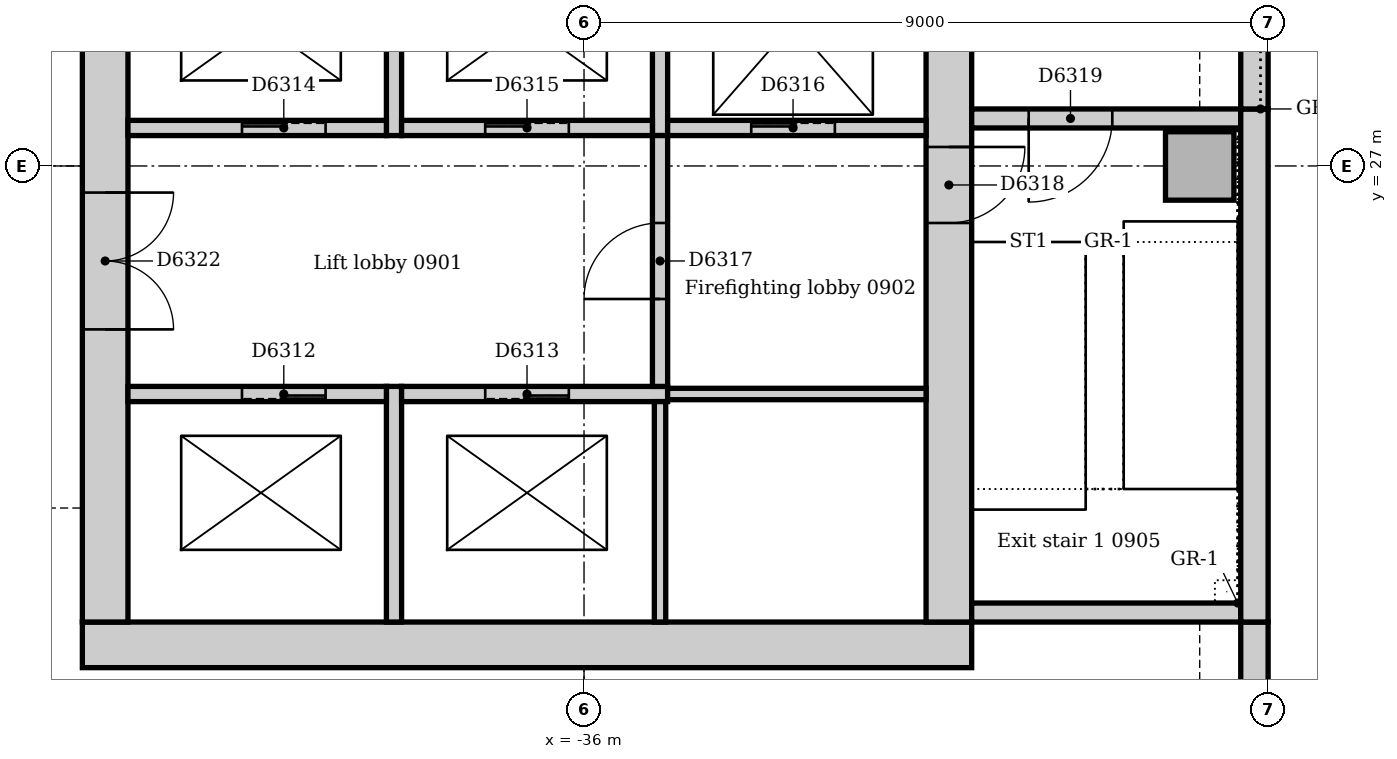
"""IFC4 building model, lengths in metres.
Left out: names, types, materials, properties, quantities, classifications, styles, units other than length and angle.
Written with IfcOpenShell. Run it as: python <this file> out.ifc"""

import sys

from ifc_helpers import new_model, si_unit, direction, frame, frame_2d, origin, origin_2d, place, context, subcontext, project, spatial, rectangle, extrude, element, fill, save


model = new_model("IFC4")
c1 = context("Model", 3, precision=1e-05, world=origin(), true_north=direction((0.0, 1.0)))
c2 = subcontext(c1, "Body", "Model", "MODEL_VIEW")
j1 = project(units=[si_unit("LENGTHUNIT", "METRE"), si_unit("PLANEANGLEUNIT", "RADIAN")], contexts=[c1])
p1 = place(None, origin())
s1 = spatial("IfcSite", under=j1, at=p1, CompositionType="ELEMENT")
p2 = place(p1, origin())
s2 = spatial("IfcBuilding", under=s1, at=p2, CompositionType="ELEMENT")
p3 = place(p2, frame((0.0, 0.0, 42.0)))
s3 = spatial("IfcBuildingStorey", under=s2, at=p3, CompositionType="ELEMENT", Elevation=42.0)
p4 = place(p3, frame((-42.6, 20.7, 0.0), z_axis=(0.0, 0.0, 1.0), x_axis=(1.0, 0.0, 0.0)))
e1 = element("IfcWall", 1, at=p4, inside=s3, PredefinedType="SOLIDWALL", context=c2, shape_type="SweptSolid", body=[
    extrude(rectangle(XDim=11.7, YDim=0.6, at=frame_2d((5.85, 0.0))), origin(), (0.0, 0.0, 1.0), 4.0),
])
p5 = place(p3, frame((-31.2, 21.0, 0.0), z_axis=(0.0, 0.0, 1.0), x_axis=(0.0, 1.0, 0.0)))
e2 = element("IfcWall", 2, at=p5, inside=s3, PredefinedType="SOLIDWALL", context=c2, shape_type="SweptSolid", body=[
    extrude(rectangle(XDim=9.5, YDim=0.6, at=frame_2d((4.75, 0.0))), origin(), (0.0, 0.0, 1.0), 4.0),
])
p6 = place(p5, frame((5.25, 0.0, 0.0)))
e3 = element("IfcOpeningElement", 3, at=p6, cuts=e2, PredefinedType="OPENING", context=c2, shape_type="SweptSolid", body=[
    extrude(rectangle(XDim=1.0, YDim=2.1, at=frame_2d((0.5, 1.05))), frame((0.0, 0.31, 0.0), z_axis=(0.0, -1.0, 0.0), x_axis=(1.0, 0.0, 0.0)), (0.0, 0.0, 1.0), 0.62),
])
p7 = place(p3, frame((-42.3, 30.5, 0.0), z_axis=(0.0, 0.0, 1.0), x_axis=(0.0, -1.0, 0.0)))
e4 = element("IfcWall", 4, at=p7, inside=s3, PredefinedType="SOLIDWALL", context=c2, shape_type="SweptSolid", body=[
    extrude(rectangle(XDim=9.5, YDim=0.6, at=frame_2d((4.75, 0.0))), origin(), (0.0, 0.0, 1.0), 4.0),
])
p8 = place(p7, frame((3.85, 0.0, 0.0)))
e5 = element("IfcOpeningElement", 5, at=p8, cuts=e4, PredefinedType="OPENING", context=c2, shape_type="SweptSolid", body=[
    extrude(rectangle(XDim=1.8, YDim=2.1, at=frame_2d((0.9, 1.05))), frame((0.0, 0.31, 0.0), z_axis=(0.0, -1.0, 0.0), x_axis=(1.0, 0.0, 0.0)), (0.0, 0.0, 1.0), 0.62),
])
p9 = place(p3, frame((-30.9, 21.125, 0.0), z_axis=(0.0, 0.0, 1.0), x_axis=(1.0, 0.0, 0.0)))
e6 = element("IfcWall", 6, at=p9, inside=s3, PredefinedType="SOLIDWALL", context=c2, shape_type="SweptSolid", body=[
    extrude(rectangle(XDim=3.54, YDim=0.25, at=frame_2d((1.77, 0.0))), origin(), (0.0, 0.0, 1.0), 4.0),
])
p10 = place(p3, frame((-27.36, 27.625, 0.0), z_axis=(0.0, 0.0, 1.0), x_axis=(-1.0, 0.0, 0.0)))
e7 = element("IfcWall", 7, at=p10, inside=s3, PredefinedType="SOLIDWALL", context=c2, shape_type="SweptSolid", body=[
    extrude(rectangle(XDim=3.54, YDim=0.25, at=frame_2d((1.77, 0.0))), origin(), (0.0, 0.0, 1.0), 4.0),
])
p11 = place(p10, frame((1.69, 0.0, 0.0)))
e8 = element("IfcOpeningElement", 8, at=p11, cuts=e7, PredefinedType="OPENING", context=c2, shape_type="SweptSolid", body=[
    extrude(rectangle(XDim=1.1, YDim=2.1, at=frame_2d((0.55, 1.05))), frame((0.0, 0.135, 0.0), z_axis=(0.0, -1.0, 0.0), x_axis=(1.0, 0.0, 0.0)), (0.0, 0.0, 1.0), 0.27),
])
p12 = place(p3, frame((-27.9, 27.0, 0.0), z_axis=(0.0, 0.0, 1.0), x_axis=(1.0, 0.0, 0.0)))
e9 = element("IfcColumn", 9, at=p12, inside=s3, PredefinedType="COLUMN", context=c2, shape_type="SweptSolid", body=[
    extrude(rectangle(XDim=0.9, YDim=0.9, at=origin_2d()), origin(), (0.0, 0.0, 1.0), 4.0),
])
p13 = place(p3, frame((-27.18, 8.743, 0.0), z_axis=(0.0, 0.0, 1.0), x_axis=(0.0, 1.0, 0.0)))
e10 = element("IfcWall", 10, at=p13, inside=s3, PredefinedType="STANDARD", context=c2, shape_type="SweptSolid", body=[
    extrude(rectangle(XDim=12.257, YDim=0.36, at=frame_2d((6.129, 0.0))), origin(), (0.0, 0.0, 1.0), 3.7),
])
p14 = place(p13, frame((2.607, 0.0, 0.9)))
e11 = element("IfcOpeningElement", 11, at=p14, cuts=e10, PredefinedType="OPENING", context=c2, shape_type="SweptSolid", body=[
    extrude(rectangle(XDim=3.3, YDim=1.6, at=frame_2d((1.65, 0.8))), frame((0.0, 0.19, 0.0), z_axis=(0.0, -1.0, 0.0), x_axis=(1.0, 0.0, 0.0)), (0.0, 0.0, 1.0), 0.38),
])
p15 = place(p13, frame((7.607, 0.0, 0.9)))
e12 = element("IfcOpeningElement", 12, at=p15, cuts=e10, PredefinedType="OPENING", context=c2, shape_type="SweptSolid", body=[
    extrude(rectangle(XDim=3.3, YDim=1.6, at=frame_2d((1.65, 0.8))), frame((0.0, 0.19, 0.0), z_axis=(0.0, -1.0, 0.0), x_axis=(1.0, 0.0, 0.0)), (0.0, 0.0, 1.0), 0.38),
])
p16 = place(p3, frame((-27.18, 21.0, 0.0), z_axis=(0.0, 0.0, 1.0), x_axis=(0.0, 1.0, 0.0)))
e13 = element("IfcWall", 13, at=p16, inside=s3, PredefinedType="STANDARD", context=c2, shape_type="SweptSolid", body=[
    extrude(rectangle(XDim=6.75, YDim=0.36, at=frame_2d((3.375, 0.0))), origin(), (0.0, 0.0, 1.0), 3.7),
])
p17 = place(p3, frame((-27.18, 27.75, 0.0), z_axis=(0.0, 0.0, 1.0), x_axis=(0.0, 1.0, 0.0)))
e14 = element("IfcWall", 14, at=p17, inside=s3, PredefinedType="STANDARD", context=c2, shape_type="SweptSolid", body=[
    extrude(rectangle(XDim=7.5, YDim=0.36, at=frame_2d((3.75, 0.0))), origin(), (0.0, 0.0, 1.0), 3.7),
])
p18 = place(p17, frame((2.85, 0.0, 1.2)))
e15 = element("IfcOpeningElement", 15, at=p18, cuts=e14, PredefinedType="OPENING", context=c2, shape_type="SweptSolid", body=[
    extrude(rectangle(XDim=1.8, YDim=1.2, at=frame_2d((0.9, 0.6))), frame((0.0, 0.19, 0.0), z_axis=(0.0, -1.0, 0.0), x_axis=(1.0, 0.0, 0.0)), (0.0, 0.0, 1.0), 0.38),
])
p19 = place(p3, frame((-38.5, 21.0, 0.0), z_axis=(0.0, 0.0, 1.0), x_axis=(0.0, 1.0, 0.0)))
e16 = element("IfcWall", 16, at=p19, inside=s3, PredefinedType="SOLIDWALL", context=c2, shape_type="SweptSolid", body=[
    extrude(rectangle(XDim=3.1, YDim=0.2, at=frame_2d((1.55, 0.0))), origin(), (0.0, 0.0, 1.0), 4.0),
])
p20 = place(p3, frame((-38.6, 24.0, 0.0), z_axis=(0.0, 0.0, 1.0), x_axis=(-1.0, 0.0, 0.0)))
e17 = element("IfcWall", 17, at=p20, inside=s3, PredefinedType="SOLIDWALL", context=c2, shape_type="SweptSolid", body=[
    extrude(rectangle(XDim=3.4, YDim=0.2, at=frame_2d((1.7, 0.0))), origin(), (0.0, 0.0, 1.0), 4.0),
])
p21 = place(p20, frame((0.8, 0.0, 0.0)))
e18 = element("IfcOpeningElement", 18, at=p21, cuts=e17, PredefinedType="OPENING", context=c2, shape_type="SweptSolid", body=[
    extrude(rectangle(XDim=1.1, YDim=2.1, at=frame_2d((0.55, 1.05))), frame((0.0, 0.11, 0.0), z_axis=(0.0, -1.0, 0.0), x_axis=(1.0, 0.0, 0.0)), (0.0, 0.0, 1.0), 0.22),
])
p22 = place(p3, frame((-34.9, 24.0, 0.0), z_axis=(0.0, 0.0, 1.0), x_axis=(-1.0, 0.0, 0.0)))
e19 = element("IfcWall", 19, at=p22, inside=s3, PredefinedType="SOLIDWALL", context=c2, shape_type="SweptSolid", body=[
    extrude(rectangle(XDim=3.5, YDim=0.2, at=frame_2d((1.75, 0.0))), origin(), (0.0, 0.0, 1.0), 4.0),
])
p23 = place(p22, frame((1.3, 0.0, 0.0)))
e20 = element("IfcOpeningElement", 20, at=p23, cuts=e19, PredefinedType="OPENING", context=c2, shape_type="SweptSolid", body=[
    extrude(rectangle(XDim=1.1, YDim=2.1, at=frame_2d((0.55, 1.05))), frame((0.0, 0.11, 0.0), z_axis=(0.0, -1.0, 0.0), x_axis=(1.0, 0.0, 0.0)), (0.0, 0.0, 1.0), 0.22),
])
p24 = place(p3, frame((-38.5, 27.4, 0.0), z_axis=(0.0, 0.0, 1.0), x_axis=(0.0, 1.0, 0.0)))
e21 = element("IfcWall", 21, at=p24, inside=s3, PredefinedType="SOLIDWALL", context=c2, shape_type="SweptSolid", body=[
    extrude(rectangle(XDim=2.85, YDim=0.2, at=frame_2d((1.425, 0.0))), origin(), (0.0, 0.0, 1.0), 4.0),
])
p25 = place(p3, frame((-42.0, 27.5, 0.0), z_axis=(0.0, 0.0, 1.0), x_axis=(1.0, 0.0, 0.0)))
e22 = element("IfcWall", 22, at=p25, inside=s3, PredefinedType="SOLIDWALL", context=c2, shape_type="SweptSolid", body=[
    extrude(rectangle(XDim=3.4, YDim=0.2, at=frame_2d((1.7, 0.0))), origin(), (0.0, 0.0, 1.0), 4.0),
])
p26 = place(p25, frame((1.5, 0.0, 0.0)))
e23 = element("IfcOpeningElement", 23, at=p26, cuts=e22, PredefinedType="OPENING", context=c2, shape_type="SweptSolid", body=[
    extrude(rectangle(XDim=1.1, YDim=2.1, at=frame_2d((0.55, 1.05))), frame((0.0, 0.11, 0.0), z_axis=(0.0, -1.0, 0.0), x_axis=(1.0, 0.0, 0.0)), (0.0, 0.0, 1.0), 0.22),
])
p27 = place(p3, frame((-35.0, 27.4, 0.0), z_axis=(0.0, 0.0, 1.0), x_axis=(0.0, 1.0, 0.0)))
e24 = element("IfcWall", 24, at=p27, inside=s3, PredefinedType="SOLIDWALL", context=c2, shape_type="SweptSolid", body=[
    extrude(rectangle(XDim=2.85, YDim=0.2, at=frame_2d((1.425, 0.0))), origin(), (0.0, 0.0, 1.0), 4.0),
])
p28 = place(p3, frame((-38.4, 27.5, 0.0), z_axis=(0.0, 0.0, 1.0), x_axis=(1.0, 0.0, 0.0)))
e25 = element("IfcWall", 25, at=p28, inside=s3, PredefinedType="SOLIDWALL", context=c2, shape_type="SweptSolid", body=[
    extrude(rectangle(XDim=3.3, YDim=0.2, at=frame_2d((1.65, 0.0))), origin(), (0.0, 0.0, 1.0), 4.0),
])
p29 = place(p28, frame((1.1, 0.0, 0.0)))
e26 = element("IfcOpeningElement", 26, at=p29, cuts=e25, PredefinedType="OPENING", context=c2, shape_type="SweptSolid", body=[
    extrude(rectangle(XDim=1.1, YDim=2.1, at=frame_2d((0.55, 1.05))), frame((0.0, 0.11, 0.0), z_axis=(0.0, -1.0, 0.0), x_axis=(1.0, 0.0, 0.0)), (0.0, 0.0, 1.0), 0.22),
])
p30 = place(p3, frame((-34.9, 27.5, 0.0), z_axis=(0.0, 0.0, 1.0), x_axis=(1.0, 0.0, 0.0)))
e27 = element("IfcWall", 27, at=p30, inside=s3, PredefinedType="SOLIDWALL", context=c2, shape_type="SweptSolid", body=[
    extrude(rectangle(XDim=3.4, YDim=0.2, at=frame_2d((1.7, 0.0))), origin(), (0.0, 0.0, 1.0), 4.0),
])
p31 = place(p30, frame((1.1, 0.0, 0.0)))
e28 = element("IfcOpeningElement", 28, at=p31, cuts=e27, PredefinedType="OPENING", context=c2, shape_type="SweptSolid", body=[
    extrude(rectangle(XDim=1.1, YDim=2.1, at=frame_2d((0.55, 1.05))), frame((0.0, 0.11, 0.0), z_axis=(0.0, -1.0, 0.0), x_axis=(1.0, 0.0, 0.0)), (0.0, 0.0, 1.0), 0.22),
])
p32 = place(p3, frame((-35.0, 24.1, 0.0), z_axis=(0.0, 0.0, 1.0), x_axis=(0.0, 1.0, 0.0)))
e29 = element("IfcWall", 29, at=p32, inside=s3, PredefinedType="SOLIDWALL", context=c2, shape_type="SweptSolid", body=[
    extrude(rectangle(XDim=3.3, YDim=0.2, at=frame_2d((1.65, 0.0))), origin(), (0.0, 0.0, 1.0), 4.0),
])
p33 = place(p32, frame((1.15, 0.0, 0.0)))
e30 = element("IfcOpeningElement", 30, at=p33, cuts=e29, PredefinedType="OPENING", context=c2, shape_type="SweptSolid", body=[
    extrude(rectangle(XDim=1.0, YDim=2.1, at=frame_2d((0.5, 1.05))), frame((0.0, 0.11, 0.0), z_axis=(0.0, -1.0, 0.0), x_axis=(1.0, 0.0, 0.0)), (0.0, 0.0, 1.0), 0.22),
])
p34 = place(p3, frame((-35.0, 21.0, 0.0), z_axis=(0.0, 0.0, 1.0), x_axis=(0.0, 1.0, 0.0)))
e31 = element("IfcWall", 31, at=p34, inside=s3, PredefinedType="SOLIDWALL", context=c2, shape_type="SweptSolid", body=[
    extrude(rectangle(XDim=2.9, YDim=0.15, at=frame_2d((1.45, 0.0))), origin(), (0.0, 0.0, 1.0), 4.0),
])
p35 = place(p3, frame((-31.5, 24.0, 0.0), z_axis=(0.0, 0.0, 1.0), x_axis=(-1.0, 0.0, 0.0)))
e32 = element("IfcWall", 32, at=p35, inside=s3, PredefinedType="SOLIDWALL", context=c2, shape_type="SweptSolid", body=[
    extrude(rectangle(XDim=3.4, YDim=0.15, at=frame_2d((1.7, 0.0))), origin(), (0.0, 0.0, 1.0), 4.0),
])
p36 = place(p21, origin())
e33 = element("IfcDoor", 33, at=p36, inside=s3, OperationType="SLIDING_TO_LEFT", PredefinedType="DOOR", context=c2, shape_type="SweptSolid", body=[
    extrude(rectangle(XDim=1.1, YDim=2.1, at=frame_2d((0.55, 1.05))), frame((0.0, 0.025, 0.0), z_axis=(0.0, -1.0, 0.0), x_axis=(1.0, 0.0, 0.0)), (0.0, 0.0, 1.0), 0.05),
])
fill(e18, e33)
p37 = place(p23, origin())
e34 = element("IfcDoor", 34, at=p37, inside=s3, OperationType="SLIDING_TO_LEFT", PredefinedType="DOOR", context=c2, shape_type="SweptSolid", body=[
    extrude(rectangle(XDim=1.1, YDim=2.1, at=frame_2d((0.55, 1.05))), frame((0.0, 0.025, 0.0), z_axis=(0.0, -1.0, 0.0), x_axis=(1.0, 0.0, 0.0)), (0.0, 0.0, 1.0), 0.05),
])
fill(e20, e34)
p38 = place(p26, origin())
e35 = element("IfcDoor", 35, at=p38, inside=s3, OperationType="SLIDING_TO_LEFT", PredefinedType="DOOR", context=c2, shape_type="SweptSolid", body=[
    extrude(rectangle(XDim=1.1, YDim=2.1, at=frame_2d((0.55, 1.05))), frame((0.0, 0.025, 0.0), z_axis=(0.0, -1.0, 0.0), x_axis=(1.0, 0.0, 0.0)), (0.0, 0.0, 1.0), 0.05),
])
fill(e23, e35)
p39 = place(p29, origin())
e36 = element("IfcDoor", 36, at=p39, inside=s3, OperationType="SLIDING_TO_LEFT", PredefinedType="DOOR", context=c2, shape_type="SweptSolid", body=[
    extrude(rectangle(XDim=1.1, YDim=2.1, at=frame_2d((0.55, 1.05))), frame((0.0, 0.025, 0.0), z_axis=(0.0, -1.0, 0.0), x_axis=(1.0, 0.0, 0.0)), (0.0, 0.0, 1.0), 0.05),
])
fill(e26, e36)
p40 = place(p31, origin())
e37 = element("IfcDoor", 37, at=p40, inside=s3, OperationType="SLIDING_TO_LEFT", PredefinedType="DOOR", context=c2, shape_type="SweptSolid", body=[
    extrude(rectangle(XDim=1.1, YDim=2.1, at=frame_2d((0.55, 1.05))), frame((0.0, 0.025, 0.0), z_axis=(0.0, -1.0, 0.0), x_axis=(1.0, 0.0, 0.0)), (0.0, 0.0, 1.0), 0.05),
])
fill(e28, e37)
p41 = place(p33, origin())
e38 = element("IfcDoor", 38, at=p41, inside=s3, OperationType="SINGLE_SWING_LEFT", PredefinedType="DOOR", context=c2, shape_type="SweptSolid", body=[
    extrude(rectangle(XDim=1.0, YDim=2.1, at=frame_2d((0.5, 1.05))), frame((0.0, 0.025, 0.0), z_axis=(0.0, -1.0, 0.0), x_axis=(1.0, 0.0, 0.0)), (0.0, 0.0, 1.0), 0.05),
])
fill(e30, e38)
p42 = place(p6, frame((1.0, 0.0, 0.0), z_axis=(0.0, 0.0, 1.0), x_axis=(-1.0, 0.0, 0.0)))
e39 = element("IfcDoor", 39, at=p42, inside=s3, OperationType="SINGLE_SWING_LEFT", PredefinedType="DOOR", context=c2, shape_type="SweptSolid", body=[
    extrude(rectangle(XDim=1.0, YDim=2.1, at=frame_2d((0.5, 1.05))), frame((0.0, 0.025, 0.0), z_axis=(0.0, -1.0, 0.0), x_axis=(1.0, 0.0, 0.0)), (0.0, 0.0, 1.0), 0.05),
])
fill(e3, e39)
p43 = place(p11, origin())
e40 = element("IfcDoor", 40, at=p43, inside=s3, OperationType="SINGLE_SWING_RIGHT", PredefinedType="DOOR", context=c2, shape_type="SweptSolid", body=[
    extrude(rectangle(XDim=1.1, YDim=2.1, at=frame_2d((0.55, 1.05))), frame((0.0, 0.025, 0.0), z_axis=(0.0, -1.0, 0.0), x_axis=(1.0, 0.0, 0.0)), (0.0, 0.0, 1.0), 0.05),
])
fill(e8, e40)
p44 = place(p8, origin())
e41 = element("IfcDoor", 41, at=p44, inside=s3, OperationType="DOUBLE_DOOR_SINGLE_SWING", PredefinedType="DOOR", context=c2, shape_type="SweptSolid", body=[
    extrude(rectangle(XDim=1.8, YDim=2.1, at=frame_2d((0.9, 1.05))), frame((0.0, 0.025, 0.0), z_axis=(0.0, -1.0, 0.0), x_axis=(1.0, 0.0, 0.0)), (0.0, 0.0, 1.0), 0.05),
])
fill(e5, e41)
save(model, sys.argv[1])
